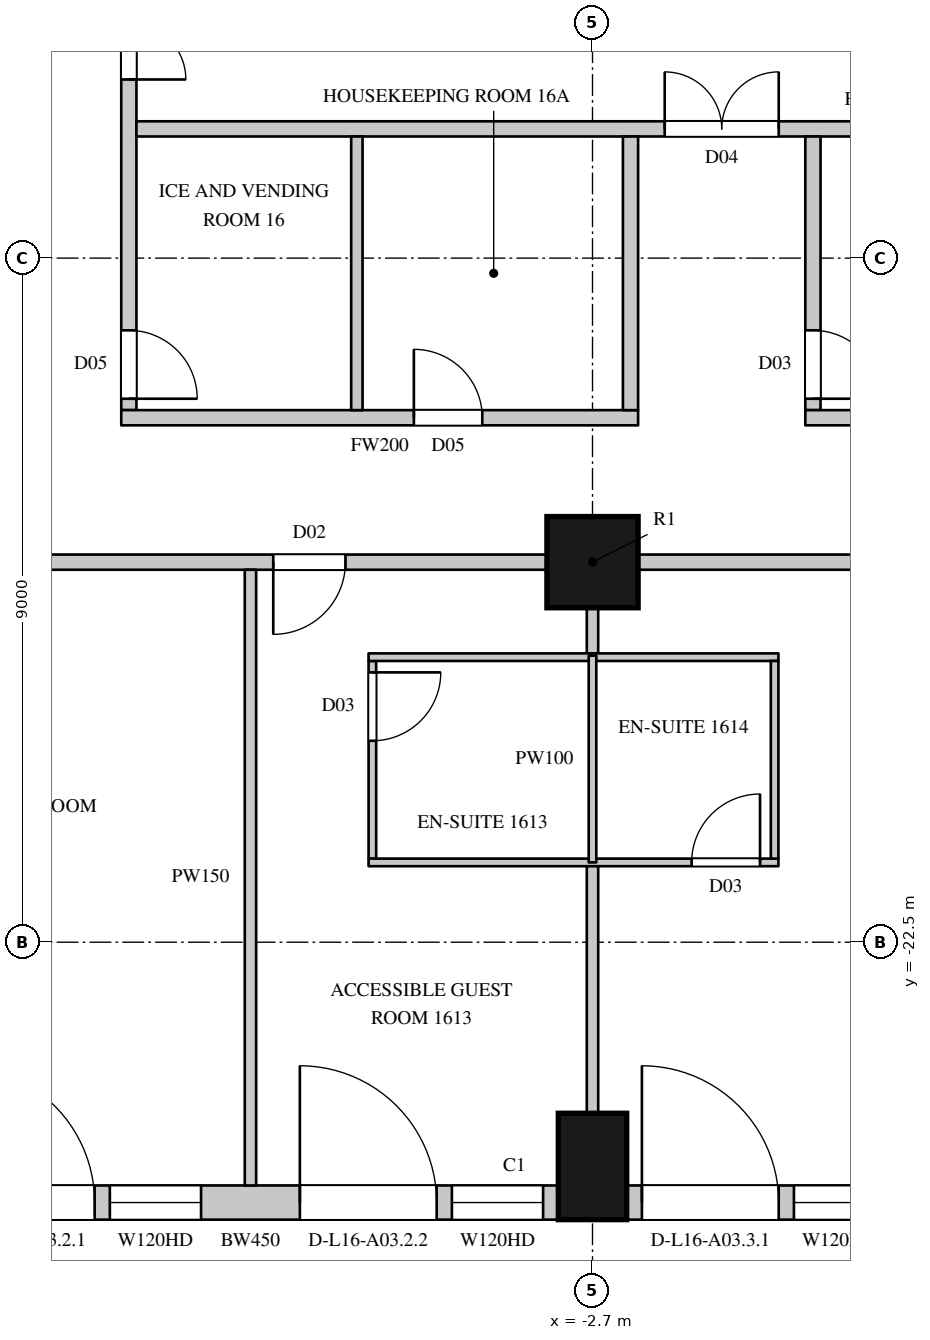
"""IFC4 building model, lengths in metres.
Left out: names, types, materials, properties, quantities, classifications, styles, units other than length and angle.
Written with IfcOpenShell. Run it as: python <this file> out.ifc"""

import sys

from ifc_helpers import new_model, si_unit, direction, frame, frame_2d, origin, origin_2d, place, context, subcontext, project, spatial, rectangle, circle, extrude, element, fill, save


model = new_model("IFC4")
c1 = context("Model", 3, precision=1e-05, world=origin(), true_north=direction((0.0, 1.0)))
c2 = subcontext(c1, "Body", "Model", "MODEL_VIEW")
j1 = project(units=[si_unit("LENGTHUNIT", "METRE"), si_unit("PLANEANGLEUNIT", "RADIAN")], contexts=[c1])
p1 = place(None, origin())
s1 = spatial("IfcSite", under=j1, at=p1, CompositionType="ELEMENT")
p2 = place(p1, origin())
s2 = spatial("IfcBuilding", under=s1, at=p2, CompositionType="ELEMENT")
p3 = place(p2, frame((0.0, 0.0, 87.9)))
s3 = spatial("IfcBuildingStorey", under=s2, at=p3, CompositionType="ELEMENT", Elevation=87.9)
p4 = place(p3, frame((-2.7, -25.45, 0.0), z_axis=(0.0, 0.0, 1.0), x_axis=(1.0, 0.0, 0.0)))
e1 = element("IfcColumn", 1, at=p4, inside=s3, PredefinedType="COLUMN", context=c2, shape_type="SweptSolid", body=[
    extrude(rectangle(XDim=0.9, YDim=1.4, at=origin_2d()), origin(), (0.0, 0.0, 1.0), 3.6),
])
p5 = place(p3, frame((-2.7, -17.5, 0.0), z_axis=(0.0, 0.0, 1.0), x_axis=(1.0, 0.0, 0.0)))
e2 = element("IfcColumn", 2, at=p5, inside=s3, PredefinedType="COLUMN", context=c2, shape_type="SweptSolid", body=[
    extrude(circle(Radius=0.6, at=origin_2d()), origin(), (0.0, 0.0, 1.0), 3.6),
])
p6 = place(p3, frame((-11.25, -25.925, 0.0), z_axis=(0.0, 0.0, 1.0), x_axis=(1.0, 0.0, 0.0)))
e3 = element("IfcWall", 3, at=p6, inside=s3, PredefinedType="SOLIDWALL", context=c2, shape_type="SweptSolid", body=[
    extrude(rectangle(XDim=8.1, YDim=0.45, at=frame_2d((4.05, 0.0))), origin(), (0.0, 0.0, 1.0), 3.3),
])
p7 = place(p6, frame((0.2, 0.0, 0.0)))
e4 = element("IfcOpeningElement", 4, at=p7, cuts=e3, PredefinedType="OPENING", context=c2, shape_type="SweptSolid", body=[
    extrude(rectangle(XDim=1.8, YDim=2.4, at=frame_2d((0.9, 1.2))), frame((0.0, 0.235, 0.0), z_axis=(0.0, -1.0, 0.0), x_axis=(1.0, 0.0, 0.0)), (0.0, 0.0, 1.0), 0.47),
])
p8 = place(p6, frame((2.2, 0.0, 1.05)))
e5 = element("IfcOpeningElement", 5, at=p8, cuts=e3, PredefinedType="OPENING", context=c2, shape_type="SweptSolid", body=[
    extrude(rectangle(XDim=1.2, YDim=2.0, at=frame_2d((0.6, 1.0))), frame((0.0, 0.235, 0.0), z_axis=(0.0, -1.0, 0.0), x_axis=(1.0, 0.0, 0.0)), (0.0, 0.0, 1.0), 0.47),
])
p9 = place(p6, frame((4.7, 0.0, 0.0)))
e6 = element("IfcOpeningElement", 6, at=p9, cuts=e3, PredefinedType="OPENING", context=c2, shape_type="SweptSolid", body=[
    extrude(rectangle(XDim=1.8, YDim=2.4, at=frame_2d((0.9, 1.2))), frame((0.0, 0.235, 0.0), z_axis=(0.0, -1.0, 0.0), x_axis=(1.0, 0.0, 0.0)), (0.0, 0.0, 1.0), 0.47),
])
p10 = place(p6, frame((6.7, 0.0, 1.05)))
e7 = element("IfcOpeningElement", 7, at=p10, cuts=e3, PredefinedType="OPENING", context=c2, shape_type="SweptSolid", body=[
    extrude(rectangle(XDim=1.2, YDim=2.0, at=frame_2d((0.6, 1.0))), frame((0.0, 0.235, 0.0), z_axis=(0.0, -1.0, 0.0), x_axis=(1.0, 0.0, 0.0)), (0.0, 0.0, 1.0), 0.47),
])
p11 = place(p3, frame((-2.25, -25.925, 0.0), z_axis=(0.0, 0.0, 1.0), x_axis=(1.0, 0.0, 0.0)))
e8 = element("IfcWall", 8, at=p11, inside=s3, PredefinedType="SOLIDWALL", context=c2, shape_type="SweptSolid", body=[
    extrude(rectangle(XDim=8.1, YDim=0.45, at=frame_2d((4.05, 0.0))), origin(), (0.0, 0.0, 1.0), 3.3),
])
p12 = place(p11, frame((0.2, 0.0, 0.0)))
e9 = element("IfcOpeningElement", 9, at=p12, cuts=e8, PredefinedType="OPENING", context=c2, shape_type="SweptSolid", body=[
    extrude(rectangle(XDim=1.8, YDim=2.4, at=frame_2d((0.9, 1.2))), frame((0.0, 0.235, 0.0), z_axis=(0.0, -1.0, 0.0), x_axis=(1.0, 0.0, 0.0)), (0.0, 0.0, 1.0), 0.47),
])
p13 = place(p11, frame((2.2, 0.0, 1.05)))
e10 = element("IfcOpeningElement", 10, at=p13, cuts=e8, PredefinedType="OPENING", context=c2, shape_type="SweptSolid", body=[
    extrude(rectangle(XDim=1.2, YDim=2.0, at=frame_2d((0.6, 1.0))), frame((0.0, 0.235, 0.0), z_axis=(0.0, -1.0, 0.0), x_axis=(1.0, 0.0, 0.0)), (0.0, 0.0, 1.0), 0.47),
])
p14 = place(p11, frame((4.7, 0.0, 0.0)))
e11 = element("IfcOpeningElement", 11, at=p14, cuts=e8, PredefinedType="OPENING", context=c2, shape_type="SweptSolid", body=[
    extrude(rectangle(XDim=1.8, YDim=2.4, at=frame_2d((0.9, 1.2))), frame((0.0, 0.235, 0.0), z_axis=(0.0, -1.0, 0.0), x_axis=(1.0, 0.0, 0.0)), (0.0, 0.0, 1.0), 0.47),
])
p15 = place(p11, frame((6.7, 0.0, 1.05)))
e12 = element("IfcOpeningElement", 12, at=p15, cuts=e8, PredefinedType="OPENING", context=c2, shape_type="SweptSolid", body=[
    extrude(rectangle(XDim=1.2, YDim=2.0, at=frame_2d((0.6, 1.0))), frame((0.0, 0.235, 0.0), z_axis=(0.0, -1.0, 0.0), x_axis=(1.0, 0.0, 0.0)), (0.0, 0.0, 1.0), 0.47),
])
p16 = place(p3, frame((-11.1, -17.5, 0.0), z_axis=(0.0, 0.0, 1.0), x_axis=(1.0, 0.0, 0.0)))
e13 = element("IfcWall", 13, at=p16, inside=s3, PredefinedType="PARTITIONING", context=c2, shape_type="SweptSolid", body=[
    extrude(rectangle(XDim=7.8, YDim=0.2, at=frame_2d((3.9, 0.0))), origin(), (0.0, 0.0, 1.0), 2.75),
])
p17 = place(p16, frame((4.2, 0.0, 0.0)))
e14 = element("IfcOpeningElement", 14, at=p17, cuts=e13, PredefinedType="OPENING", context=c2, shape_type="SweptSolid", body=[
    extrude(rectangle(XDim=0.95, YDim=2.2, at=frame_2d((0.475, 1.1))), frame((0.0, 0.11, 0.0), z_axis=(0.0, -1.0, 0.0), x_axis=(1.0, 0.0, 0.0)), (0.0, 0.0, 1.0), 0.22),
])
p18 = place(p3, frame((-2.1, -17.5, 0.0), z_axis=(0.0, 0.0, 1.0), x_axis=(1.0, 0.0, 0.0)))
e15 = element("IfcWall", 15, at=p18, inside=s3, PredefinedType="PARTITIONING", context=c2, shape_type="SweptSolid", body=[
    extrude(rectangle(XDim=7.8, YDim=0.2, at=frame_2d((3.9, 0.0))), origin(), (0.0, 0.0, 1.0), 2.75),
])
p19 = place(p18, frame((4.15, 0.0, 0.0)))
e16 = element("IfcOpeningElement", 16, at=p19, cuts=e15, PredefinedType="OPENING", context=c2, shape_type="SweptSolid", body=[
    extrude(rectangle(XDim=0.95, YDim=2.2, at=frame_2d((0.475, 1.1))), frame((0.0, 0.11, 0.0), z_axis=(0.0, -1.0, 0.0), x_axis=(1.0, 0.0, 0.0)), (0.0, 0.0, 1.0), 0.22),
])
p20 = place(p3, frame((-8.8, -15.5, 0.0), z_axis=(0.0, 0.0, 1.0), x_axis=(0.0, 1.0, 0.0)))
e17 = element("IfcWall", 17, at=p20, inside=s3, PredefinedType="PARTITIONING", context=c2, shape_type="SweptSolid", body=[
    extrude(rectangle(XDim=27.2, YDim=0.2, at=frame_2d((13.6, 0.0))), origin(), (0.0, 0.0, 1.0), 3.3),
])
p21 = place(p20, frame((19.25, 0.0, 0.0)))
e18 = element("IfcOpeningElement", 18, at=p21, cuts=e17, PredefinedType="OPENING", context=c2, shape_type="SweptSolid", body=[
    extrude(rectangle(XDim=1.5, YDim=2.2, at=frame_2d((0.75, 1.1))), frame((0.0, 0.11, 0.0), z_axis=(0.0, -1.0, 0.0), x_axis=(1.0, 0.0, 0.0)), (0.0, 0.0, 1.0), 0.22),
])
p22 = place(p20, frame((4.35, 0.0, 0.0)))
e19 = element("IfcOpeningElement", 19, at=p22, cuts=e17, PredefinedType="OPENING", context=c2, shape_type="SweptSolid", body=[
    extrude(rectangle(XDim=1.5, YDim=2.2, at=frame_2d((0.75, 1.1))), frame((0.0, 0.11, 0.0), z_axis=(0.0, -1.0, 0.0), x_axis=(1.0, 0.0, 0.0)), (0.0, 0.0, 1.0), 0.22),
])
p23 = place(p20, frame((25.55, 0.0, 0.0)))
e20 = element("IfcOpeningElement", 20, at=p23, cuts=e17, PredefinedType="OPENING", context=c2, shape_type="SweptSolid", body=[
    extrude(rectangle(XDim=1.5, YDim=2.2, at=frame_2d((0.75, 1.1))), frame((0.0, 0.11, 0.0), z_axis=(0.0, -1.0, 0.0), x_axis=(1.0, 0.0, 0.0)), (0.0, 0.0, 1.0), 0.22),
])
p24 = place(p20, frame((0.15, 0.0, 0.0)))
e21 = element("IfcOpeningElement", 21, at=p24, cuts=e17, PredefinedType="OPENING", context=c2, shape_type="SweptSolid", body=[
    extrude(rectangle(XDim=0.9, YDim=2.2, at=frame_2d((0.45, 1.1))), frame((0.0, 0.11, 0.0), z_axis=(0.0, -1.0, 0.0), x_axis=(1.0, 0.0, 0.0)), (0.0, 0.0, 1.0), 0.22),
])
p25 = place(p3, frame((-8.9, -15.6, 0.0), z_axis=(0.0, 0.0, 1.0), x_axis=(1.0, 0.0, 0.0)))
e22 = element("IfcWall", 22, at=p25, inside=s3, PredefinedType="PARTITIONING", context=c2, shape_type="SweptSolid", body=[
    extrude(rectangle(XDim=6.8, YDim=0.2, at=frame_2d((3.4, 0.0))), origin(), (0.0, 0.0, 1.0), 3.3),
])
p26 = place(p25, frame((3.85, 0.0, 0.0)))
e23 = element("IfcOpeningElement", 23, at=p26, cuts=e22, PredefinedType="OPENING", context=c2, shape_type="SweptSolid", body=[
    extrude(rectangle(XDim=0.9, YDim=2.2, at=frame_2d((0.45, 1.1))), frame((0.0, 0.11, 0.0), z_axis=(0.0, -1.0, 0.0), x_axis=(1.0, 0.0, 0.0)), (0.0, 0.0, 1.0), 0.22),
])
p27 = place(p3, frame((-8.7, -11.8, 0.0), z_axis=(0.0, 0.0, 1.0), x_axis=(1.0, 0.0, 0.0)))
e24 = element("IfcWall", 24, at=p27, inside=s3, PredefinedType="PARTITIONING", context=c2, shape_type="SweptSolid", body=[
    extrude(rectangle(XDim=19.4, YDim=0.2, at=frame_2d((9.7, 0.0))), origin(), (0.0, 0.0, 1.0), 3.3),
])
p28 = place(p27, frame((6.95, 0.0, 0.0)))
e25 = element("IfcOpeningElement", 25, at=p28, cuts=e24, PredefinedType="OPENING", context=c2, shape_type="SweptSolid", body=[
    extrude(rectangle(XDim=1.5, YDim=2.2, at=frame_2d((0.75, 1.1))), frame((0.0, 0.11, 0.0), z_axis=(0.0, -1.0, 0.0), x_axis=(1.0, 0.0, 0.0)), (0.0, 0.0, 1.0), 0.22),
])
p29 = place(p3, frame((-2.2, -15.5, 0.0), z_axis=(0.0, 0.0, 1.0), x_axis=(0.0, 1.0, 0.0)))
e26 = element("IfcWall", 26, at=p29, inside=s3, PredefinedType="PARTITIONING", context=c2, shape_type="SweptSolid", body=[
    extrude(rectangle(XDim=3.6, YDim=0.2, at=frame_2d((1.8, 0.0))), origin(), (0.0, 0.0, 1.0), 3.3),
])
p30 = place(p3, frame((0.2, -15.5, 0.0), z_axis=(0.0, 0.0, 1.0), x_axis=(0.0, 1.0, 0.0)))
e27 = element("IfcWall", 27, at=p30, inside=s3, PredefinedType="PARTITIONING", context=c2, shape_type="SweptSolid", body=[
    extrude(rectangle(XDim=3.6, YDim=0.2, at=frame_2d((1.8, 0.0))), origin(), (0.0, 0.0, 1.0), 3.3),
])
p31 = place(p30, frame((0.15, 0.0, 0.0)))
e28 = element("IfcOpeningElement", 28, at=p31, cuts=e27, PredefinedType="OPENING", context=c2, shape_type="SweptSolid", body=[
    extrude(rectangle(XDim=0.9, YDim=2.2, at=frame_2d((0.45, 1.1))), frame((0.0, 0.11, 0.0), z_axis=(0.0, -1.0, 0.0), x_axis=(1.0, 0.0, 0.0)), (0.0, 0.0, 1.0), 0.22),
])
p32 = place(p3, frame((0.1, -15.6, 0.0), z_axis=(0.0, 0.0, 1.0), x_axis=(1.0, 0.0, 0.0)))
e29 = element("IfcWall", 29, at=p32, inside=s3, PredefinedType="PARTITIONING", context=c2, shape_type="SweptSolid", body=[
    extrude(rectangle(XDim=14.2, YDim=0.2, at=frame_2d((7.1, 0.0))), origin(), (0.0, 0.0, 1.0), 3.3),
])
p33 = place(p3, frame((-7.2, -25.7, 0.0), z_axis=(0.0, 0.0, 1.0), x_axis=(0.0, 1.0, 0.0)))
e30 = element("IfcWall", 30, at=p33, inside=s3, PredefinedType="PARTITIONING", context=c2, shape_type="SweptSolid", body=[
    extrude(rectangle(XDim=8.1, YDim=0.15, at=frame_2d((4.05, 0.0))), origin(), (0.0, 0.0, 1.0), 2.65),
])
p34 = place(p3, frame((-5.8, -15.5, 0.0), z_axis=(0.0, 0.0, 1.0), x_axis=(0.0, 1.0, 0.0)))
e31 = element("IfcWall", 31, at=p34, inside=s3, PredefinedType="PARTITIONING", context=c2, shape_type="SweptSolid", body=[
    extrude(rectangle(XDim=3.6, YDim=0.15, at=frame_2d((1.8, 0.0))), origin(), (0.0, 0.0, 1.0), 3.3),
])
p35 = place(p3, frame((-2.7, -24.75, 0.0), z_axis=(0.0, 0.0, 1.0), x_axis=(0.0, 1.0, 0.0)))
e32 = element("IfcWall", 32, at=p35, inside=s3, PredefinedType="PARTITIONING", context=c2, shape_type="SweptSolid", body=[
    extrude(rectangle(XDim=3.3, YDim=0.15, at=frame_2d((1.65, 0.0))), origin(), (0.0, 0.0, 1.0), 2.75),
])
p36 = place(p3, frame((-2.7, -18.73, 0.0), z_axis=(0.0, 0.0, 1.0), x_axis=(0.0, 1.0, 0.0)))
e33 = element("IfcWall", 33, at=p36, inside=s3, PredefinedType="PARTITIONING", context=c2, shape_type="SweptSolid", body=[
    extrude(rectangle(XDim=0.63, YDim=0.15, at=frame_2d((0.315, 0.0))), origin(), (0.0, 0.0, 1.0), 2.75),
])
p37 = place(p3, frame((-5.596, -21.4, 0.0), z_axis=(0.0, 0.0, 1.0), x_axis=(0.0, 1.0, 0.0)))
e34 = element("IfcWall", 34, at=p37, inside=s3, PredefinedType="PARTITIONING", context=c2, shape_type="SweptSolid", body=[
    extrude(rectangle(XDim=2.6, YDim=0.1, at=frame_2d((1.3, 0.0))), origin(), (0.0, 0.0, 1.0), 3.3),
])
p38 = place(p37, frame((1.55, 0.0, 0.0)))
e35 = element("IfcOpeningElement", 35, at=p38, cuts=e34, PredefinedType="OPENING", context=c2, shape_type="SweptSolid", body=[
    extrude(rectangle(XDim=0.9, YDim=2.2, at=frame_2d((0.45, 1.1))), frame((0.0, 0.06, 0.0), z_axis=(0.0, -1.0, 0.0), x_axis=(1.0, 0.0, 0.0)), (0.0, 0.0, 1.0), 0.12),
])
p39 = place(p3, frame((-5.646, -21.45, 0.0), z_axis=(0.0, 0.0, 1.0), x_axis=(1.0, 0.0, 0.0)))
e36 = element("IfcWall", 36, at=p39, inside=s3, PredefinedType="PARTITIONING", context=c2, shape_type="SweptSolid", body=[
    extrude(rectangle(XDim=5.392, YDim=0.1, at=frame_2d((2.696, 0.0))), origin(), (0.0, 0.0, 1.0), 3.3),
])
p40 = place(p39, frame((4.25, 0.0, 0.0)))
e37 = element("IfcOpeningElement", 37, at=p40, cuts=e36, PredefinedType="OPENING", context=c2, shape_type="SweptSolid", body=[
    extrude(rectangle(XDim=0.9, YDim=2.2, at=frame_2d((0.45, 1.1))), frame((0.0, 0.06, 0.0), z_axis=(0.0, -1.0, 0.0), x_axis=(1.0, 0.0, 0.0)), (0.0, 0.0, 1.0), 0.12),
])
p41 = place(p3, frame((-5.646, -18.75, 0.0), z_axis=(0.0, 0.0, 1.0), x_axis=(1.0, 0.0, 0.0)))
e38 = element("IfcWall", 38, at=p41, inside=s3, PredefinedType="PARTITIONING", context=c2, shape_type="SweptSolid", body=[
    extrude(rectangle(XDim=5.392, YDim=0.1, at=frame_2d((2.696, 0.0))), origin(), (0.0, 0.0, 1.0), 3.3),
])
p42 = place(p3, frame((-2.7, -21.45, 0.0), z_axis=(0.0, 0.0, 1.0), x_axis=(0.0, 1.0, 0.0)))
e39 = element("IfcWall", 39, at=p42, inside=s3, PredefinedType="PARTITIONING", context=c2, shape_type="SweptSolid", body=[
    extrude(rectangle(XDim=2.72, YDim=0.1, at=frame_2d((1.36, 0.0))), origin(), (0.0, 0.0, 1.0), 2.75),
])
p43 = place(p3, frame((-0.304, -21.4, 0.0), z_axis=(0.0, 0.0, 1.0), x_axis=(0.0, 1.0, 0.0)))
e40 = element("IfcWall", 40, at=p43, inside=s3, PredefinedType="PARTITIONING", context=c2, shape_type="SweptSolid", body=[
    extrude(rectangle(XDim=2.6, YDim=0.1, at=frame_2d((1.3, 0.0))), origin(), (0.0, 0.0, 1.0), 3.3),
])
p44 = place(p7, origin())
e41 = element("IfcDoor", 41, at=p44, inside=s3, OperationType="SLIDING_TO_LEFT", PredefinedType="DOOR", context=c2, shape_type="SweptSolid", body=[
    extrude(rectangle(XDim=1.8, YDim=2.4, at=frame_2d((0.9, 1.2))), frame((0.0, 0.13, 0.0), z_axis=(0.0, -1.0, 0.0), x_axis=(1.0, 0.0, 0.0)), (0.0, 0.0, 1.0), 0.05),
])
fill(e4, e41)
p45 = place(p8, origin())
e42 = element("IfcWindow", 42, at=p45, inside=s3, PartitioningType="SINGLE_PANEL", PredefinedType="WINDOW", context=c2, shape_type="SweptSolid", body=[
    extrude(rectangle(XDim=1.2, YDim=2.0, at=frame_2d((0.6, 1.0))), frame((0.0, 0.135, 0.0), z_axis=(0.0, -1.0, 0.0), x_axis=(1.0, 0.0, 0.0)), (0.0, 0.0, 1.0), 0.06),
])
fill(e5, e42)
p46 = place(p9, origin())
e43 = element("IfcDoor", 43, at=p46, inside=s3, OperationType="SLIDING_TO_LEFT", PredefinedType="DOOR", context=c2, shape_type="SweptSolid", body=[
    extrude(rectangle(XDim=1.8, YDim=2.4, at=frame_2d((0.9, 1.2))), frame((0.0, 0.13, 0.0), z_axis=(0.0, -1.0, 0.0), x_axis=(1.0, 0.0, 0.0)), (0.0, 0.0, 1.0), 0.05),
])
fill(e6, e43)
p47 = place(p10, origin())
e44 = element("IfcWindow", 44, at=p47, inside=s3, PartitioningType="SINGLE_PANEL", PredefinedType="WINDOW", context=c2, shape_type="SweptSolid", body=[
    extrude(rectangle(XDim=1.2, YDim=2.0, at=frame_2d((0.6, 1.0))), frame((0.0, 0.135, 0.0), z_axis=(0.0, -1.0, 0.0), x_axis=(1.0, 0.0, 0.0)), (0.0, 0.0, 1.0), 0.06),
])
fill(e7, e44)
p48 = place(p12, origin())
e45 = element("IfcDoor", 45, at=p48, inside=s3, OperationType="SLIDING_TO_LEFT", PredefinedType="DOOR", context=c2, shape_type="SweptSolid", body=[
    extrude(rectangle(XDim=1.8, YDim=2.4, at=frame_2d((0.9, 1.2))), frame((0.0, 0.13, 0.0), z_axis=(0.0, -1.0, 0.0), x_axis=(1.0, 0.0, 0.0)), (0.0, 0.0, 1.0), 0.05),
])
fill(e9, e45)
p49 = place(p13, origin())
e46 = element("IfcWindow", 46, at=p49, inside=s3, PartitioningType="SINGLE_PANEL", PredefinedType="WINDOW", context=c2, shape_type="SweptSolid", body=[
    extrude(rectangle(XDim=1.2, YDim=2.0, at=frame_2d((0.6, 1.0))), frame((0.0, 0.135, 0.0), z_axis=(0.0, -1.0, 0.0), x_axis=(1.0, 0.0, 0.0)), (0.0, 0.0, 1.0), 0.06),
])
fill(e10, e46)
p50 = place(p22, origin())
e47 = element("IfcDoor", 47, at=p50, inside=s3, OperationType="DOUBLE_DOOR_SINGLE_SWING", PredefinedType="DOOR", context=c2, shape_type="SweptSolid", body=[
    extrude(rectangle(XDim=1.5, YDim=2.2, at=frame_2d((0.75, 1.1))), frame((0.0, 0.025, 0.0), z_axis=(0.0, -1.0, 0.0), x_axis=(1.0, 0.0, 0.0)), (0.0, 0.0, 1.0), 0.05),
])
fill(e19, e47)
p51 = place(p28, origin())
e48 = element("IfcDoor", 48, at=p51, inside=s3, OperationType="DOUBLE_DOOR_SINGLE_SWING", PredefinedType="DOOR", context=c2, shape_type="SweptSolid", body=[
    extrude(rectangle(XDim=1.5, YDim=2.2, at=frame_2d((0.75, 1.1))), frame((0.0, 0.025, 0.0), z_axis=(0.0, -1.0, 0.0), x_axis=(1.0, 0.0, 0.0)), (0.0, 0.0, 1.0), 0.05),
])
fill(e25, e48)
p52 = place(p24, origin())
e49 = element("IfcDoor", 49, at=p52, inside=s3, OperationType="SINGLE_SWING_RIGHT", PredefinedType="DOOR", context=c2, shape_type="SweptSolid", body=[
    extrude(rectangle(XDim=0.9, YDim=2.2, at=frame_2d((0.45, 1.1))), frame((0.0, 0.025, 0.0), z_axis=(0.0, -1.0, 0.0), x_axis=(1.0, 0.0, 0.0)), (0.0, 0.0, 1.0), 0.05),
])
fill(e21, e49)
p53 = place(p26, origin())
e50 = element("IfcDoor", 50, at=p53, inside=s3, OperationType="SINGLE_SWING_LEFT", PredefinedType="DOOR", context=c2, shape_type="SweptSolid", body=[
    extrude(rectangle(XDim=0.9, YDim=2.2, at=frame_2d((0.45, 1.1))), frame((0.0, 0.025, 0.0), z_axis=(0.0, -1.0, 0.0), x_axis=(1.0, 0.0, 0.0)), (0.0, 0.0, 1.0), 0.05),
])
fill(e23, e50)
p54 = place(p31, origin())
e51 = element("IfcDoor", 51, at=p54, inside=s3, OperationType="SINGLE_SWING_RIGHT", PredefinedType="DOOR", context=c2, shape_type="SweptSolid", body=[
    extrude(rectangle(XDim=0.9, YDim=2.2, at=frame_2d((0.45, 1.1))), frame((0.0, 0.025, 0.0), z_axis=(0.0, -1.0, 0.0), x_axis=(1.0, 0.0, 0.0)), (0.0, 0.0, 1.0), 0.05),
])
fill(e28, e51)
p55 = place(p17, origin())
e52 = element("IfcDoor", 52, at=p55, inside=s3, OperationType="SINGLE_SWING_RIGHT", PredefinedType="DOOR", context=c2, shape_type="SweptSolid", body=[
    extrude(rectangle(XDim=0.95, YDim=2.2, at=frame_2d((0.475, 1.1))), frame((0.0, 0.025, 0.0), z_axis=(0.0, -1.0, 0.0), x_axis=(1.0, 0.0, 0.0)), (0.0, 0.0, 1.0), 0.05),
])
fill(e14, e52)
p56 = place(p38, origin())
e53 = element("IfcDoor", 53, at=p56, inside=s3, OperationType="SINGLE_SWING_LEFT", PredefinedType="DOOR", context=c2, shape_type="SweptSolid", body=[
    extrude(rectangle(XDim=0.9, YDim=2.2, at=frame_2d((0.45, 1.1))), frame((0.0, 0.025, 0.0), z_axis=(0.0, -1.0, 0.0), x_axis=(1.0, 0.0, 0.0)), (0.0, 0.0, 1.0), 0.05),
])
fill(e35, e53)
p57 = place(p40, origin())
e54 = element("IfcDoor", 54, at=p57, inside=s3, OperationType="SINGLE_SWING_RIGHT", PredefinedType="DOOR", context=c2, shape_type="SweptSolid", body=[
    extrude(rectangle(XDim=0.9, YDim=2.2, at=frame_2d((0.45, 1.1))), frame((0.0, 0.025, 0.0), z_axis=(0.0, -1.0, 0.0), x_axis=(1.0, 0.0, 0.0)), (0.0, 0.0, 1.0), 0.05),
])
fill(e37, e54)
save(model, sys.argv[1])
